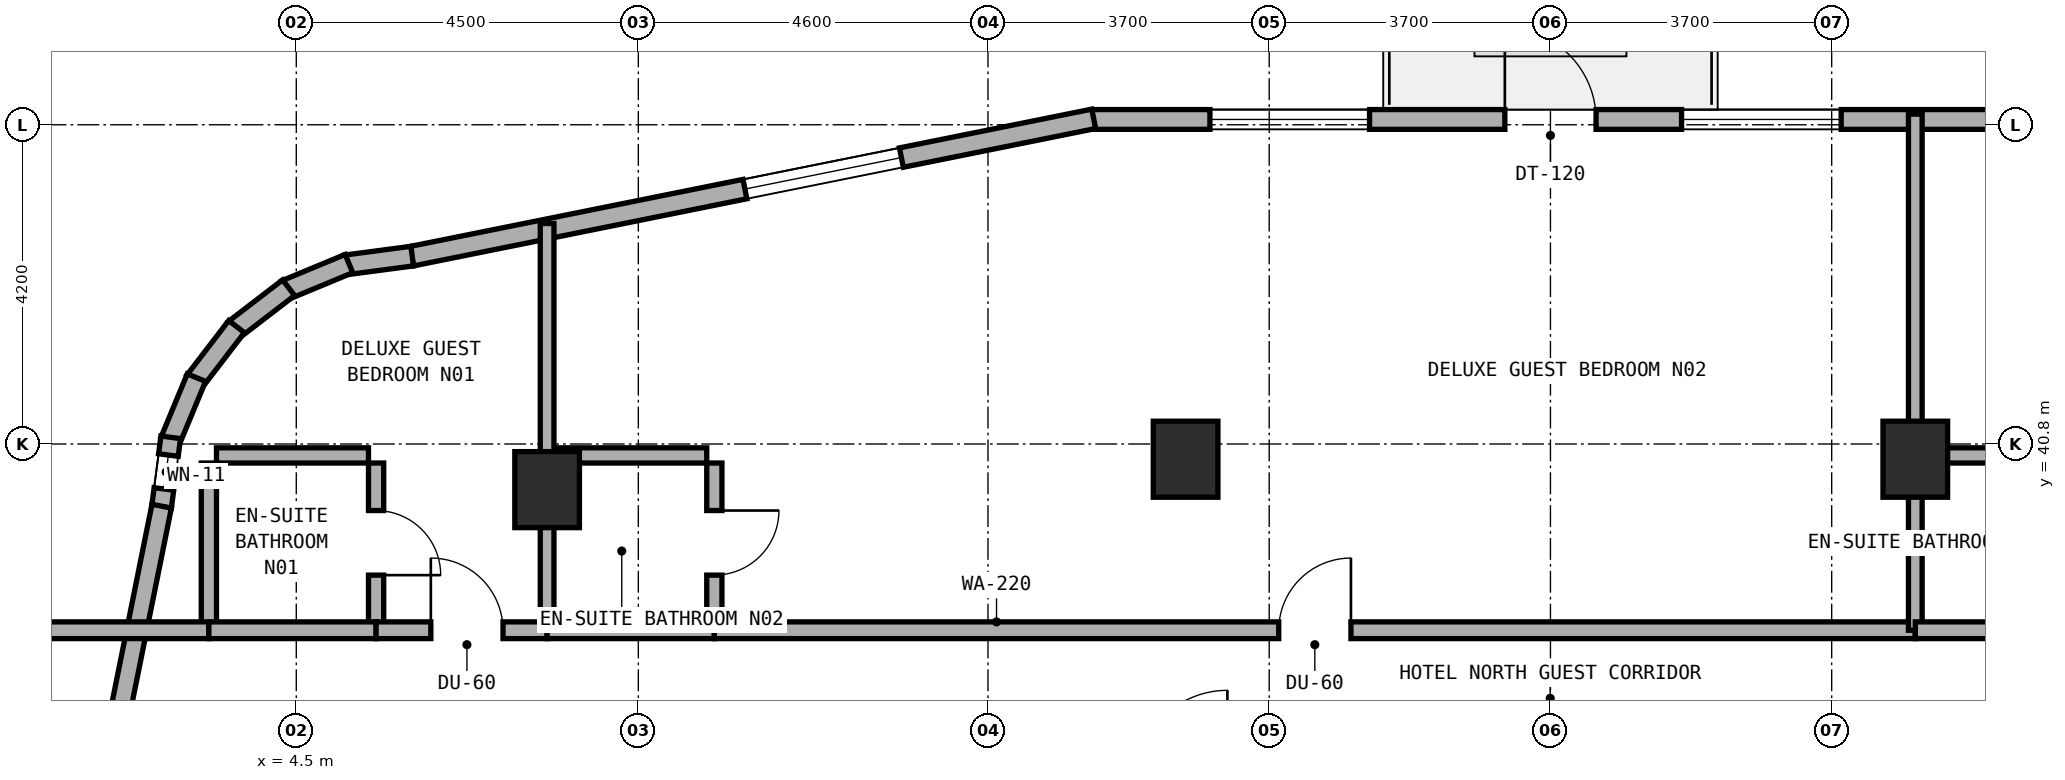
"""IFC4 building model, lengths in metres.
Left out: names, types, materials, properties, quantities, classifications, styles, units other than length and angle.
Written with IfcOpenShell. Run it as: python <this file> out.ifc"""

import sys

from ifc_helpers import new_model, si_unit, direction, frame, frame_2d, origin, origin_2d, place, context, subcontext, project, spatial, rectangle, extrude, element, fill, save


model = new_model("IFC4")
c1 = context("Model", 3, precision=1e-05, world=origin(), true_north=direction((0.0, 1.0)))
c2 = subcontext(c1, "Body", "Model", "MODEL_VIEW")
j1 = project(units=[si_unit("LENGTHUNIT", "METRE"), si_unit("PLANEANGLEUNIT", "RADIAN")], contexts=[c1])
p1 = place(None, origin())
s1 = spatial("IfcSite", under=j1, at=p1, CompositionType="ELEMENT")
p2 = place(p1, origin())
s2 = spatial("IfcBuilding", under=s1, at=p2, CompositionType="ELEMENT")
p3 = place(p2, frame((0.0, 0.0, 134.5)))
s3 = spatial("IfcBuildingStorey", under=s2, at=p3, CompositionType="ELEMENT", Elevation=134.5)
for number, where, z_axis, x_axis in (
    (1, (16.2, 40.6, 0.0), (0.0, 0.0, 1.0), (1.0, 0.0, 0.0)),
    (2, (25.8, 40.6, 0.0), (0.0, 0.0, 1.0), (1.0, 0.0, 0.0)),
    (3, (7.8, 40.2, 0.0), (0.0, 0.0, 1.0), (1.0, 0.0, 0.0)),
):
    element("IfcColumn", number, at=place(p3, frame(where, z_axis=z_axis, x_axis=x_axis)), inside=s3, PredefinedType="COLUMN", context=c2, shape_type="SweptSolid", body=[
        extrude(rectangle(XDim=0.85, YDim=1.0, at=origin_2d()), origin(), (0.0, 0.0, 1.0), 3.5),
    ])
p4 = place(p3, frame((27.085, 45.07, 0.0), z_axis=(0.0, 0.0, 1.0), x_axis=(-1.0, 0.0, 0.0)))
e4 = element("IfcWall", 4, at=p4, inside=s3, PredefinedType="STANDARD", context=c2, shape_type="SweptSolid", body=[
    extrude(rectangle(XDim=12.135, YDim=0.26, at=frame_2d((6.067, 0.0))), origin(), (0.0, 0.0, 1.0), 3.22),
])
p5 = place(p4, frame((5.485, 0.0, 0.0)))
e5 = element("IfcOpeningElement", 5, at=p5, cuts=e4, PredefinedType="OPENING", context=c2, shape_type="SweptSolid", body=[
    extrude(rectangle(XDim=1.2, YDim=2.15, at=frame_2d((0.6, 1.075))), frame((0.0, 0.14, 0.0), z_axis=(0.0, -1.0, 0.0), x_axis=(1.0, 0.0, 0.0)), (0.0, 0.0, 1.0), 0.28),
])
p6 = place(p4, frame((2.26, 0.0, 0.85)))
e6 = element("IfcOpeningElement", 6, at=p6, cuts=e4, PredefinedType="OPENING", context=c2, shape_type="SweptSolid", body=[
    extrude(rectangle(XDim=2.1, YDim=1.5, at=frame_2d((1.05, 0.75))), frame((0.0, 0.14, 0.0), z_axis=(0.0, -1.0, 0.0), x_axis=(1.0, 0.0, 0.0)), (0.0, 0.0, 1.0), 0.28),
])
p7 = place(p4, frame((8.465, 0.0, 0.85)))
e7 = element("IfcOpeningElement", 7, at=p7, cuts=e4, PredefinedType="OPENING", context=c2, shape_type="SweptSolid", body=[
    extrude(rectangle(XDim=2.1, YDim=1.5, at=frame_2d((1.05, 0.75))), frame((0.0, 0.14, 0.0), z_axis=(0.0, -1.0, 0.0), x_axis=(1.0, 0.0, 0.0)), (0.0, 0.0, 1.0), 0.28),
])
p8 = place(p3, frame((14.991, 45.078, 0.0), z_axis=(0.0, 0.0, 1.0), x_axis=(-0.980321298532, -0.197408590603, 0.0)))
e8 = element("IfcWall", 8, at=p8, inside=s3, PredefinedType="STANDARD", context=c2, shape_type="SweptSolid", body=[
    extrude(rectangle(XDim=9.153, YDim=0.26, at=frame_2d((4.577, 0.0))), origin(), (0.0, 0.0, 1.0), 3.22),
])
p9 = place(p8, frame((2.581, 0.0, 0.85)))
e9 = element("IfcOpeningElement", 9, at=p9, cuts=e8, PredefinedType="OPENING", context=c2, shape_type="SweptSolid", body=[
    extrude(rectangle(XDim=2.1, YDim=1.5, at=frame_2d((1.05, 0.75))), frame((0.0, 0.14, 0.0), z_axis=(0.0, -1.0, 0.0), x_axis=(1.0, 0.0, 0.0)), (0.0, 0.0, 1.0), 0.28),
])
p10 = place(p3, frame((6.025, 43.272, 0.0), z_axis=(0.0, 0.0, 1.0), x_axis=(-0.991388484223, -0.130953706898, 0.0)))
e10 = element("IfcWall", 10, at=p10, inside=s3, PredefinedType="STANDARD", context=c2, shape_type="SweptSolid", body=[
    extrude(rectangle(XDim=0.885, YDim=0.26, at=frame_2d((0.443, 0.0))), origin(), (0.0, 0.0, 1.0), 3.22),
])
p11 = place(p3, frame((5.193, 43.174, 0.0), z_axis=(0.0, 0.0, 1.0), x_axis=(-0.923627776508, -0.383290660547, 0.0)))
e11 = element("IfcWall", 11, at=p11, inside=s3, PredefinedType="STANDARD", context=c2, shape_type="SweptSolid", body=[
    extrude(rectangle(XDim=0.903, YDim=0.26, at=frame_2d((0.452, 0.0))), origin(), (0.0, 0.0, 1.0), 3.22),
])
p12 = place(p3, frame((4.399, 42.856, 0.0), z_axis=(0.0, 0.0, 1.0), x_axis=(-0.793458244748, -0.608624690463, 0.0)))
e12 = element("IfcWall", 12, at=p12, inside=s3, PredefinedType="STANDARD", context=c2, shape_type="SweptSolid", body=[
    extrude(rectangle(XDim=0.902, YDim=0.26, at=frame_2d((0.451, 0.0))), origin(), (0.0, 0.0, 1.0), 3.22),
])
p13 = place(p3, frame((3.714, 42.345, 0.0), z_axis=(0.0, 0.0, 1.0), x_axis=(-0.608494022858, -0.793558456666, 0.0)))
e13 = element("IfcWall", 13, at=p13, inside=s3, PredefinedType="STANDARD", context=c2, shape_type="SweptSolid", body=[
    extrude(rectangle(XDim=0.902, YDim=0.26, at=frame_2d((0.451, 0.0))), origin(), (0.0, 0.0, 1.0), 3.22),
])
p14 = place(p3, frame((3.186, 41.673, 0.0), z_axis=(0.0, 0.0, 1.0), x_axis=(-0.383155708213, -0.923683767999, 0.0)))
e14 = element("IfcWall", 14, at=p14, inside=s3, PredefinedType="STANDARD", context=c2, shape_type="SweptSolid", body=[
    extrude(rectangle(XDim=0.903, YDim=0.26, at=frame_2d((0.451, 0.0))), origin(), (0.0, 0.0, 1.0), 3.22),
])
p15 = place(p3, frame((2.848, 40.888, 0.0), z_axis=(0.0, 0.0, 1.0), x_axis=(-0.130200706103, -0.991487658083, 0.0)))
e15 = element("IfcWall", 15, at=p15, inside=s3, PredefinedType="STANDARD", context=c2, shape_type="SweptSolid", body=[
    extrude(rectangle(XDim=0.921, YDim=0.26, at=frame_2d((0.46, 0.0))), origin(), (0.0, 0.0, 1.0), 3.22),
])
p16 = place(p15, frame((0.235, 0.0, 0.85)))
e16 = element("IfcOpeningElement", 16, at=p16, cuts=e15, PredefinedType="OPENING", context=c2, shape_type="SweptSolid", body=[
    extrude(rectangle(XDim=0.45, YDim=1.5, at=frame_2d((0.225, 0.75))), frame((0.0, 0.14, 0.0), z_axis=(0.0, -1.0, 0.0), x_axis=(1.0, 0.0, 0.0)), (0.0, 0.0, 1.0), 0.28),
])
p17 = place(p3, frame((2.729, 39.982, 0.0), z_axis=(0.0, 0.0, 1.0), x_axis=(-0.197435082048, -0.980315963543, 0.0)))
e17 = element("IfcWall", 17, at=p17, inside=s3, PredefinedType="STANDARD", context=c2, shape_type="SweptSolid", body=[
    extrude(rectangle(XDim=9.183, YDim=0.26, at=frame_2d((4.591, 0.0))), origin(), (0.0, 0.0, 1.0), 3.22),
])
p18 = place(p17, frame((4.436, 0.0, 0.85)))
e18 = element("IfcOpeningElement", 18, at=p18, cuts=e17, PredefinedType="OPENING", context=c2, shape_type="SweptSolid", body=[
    extrude(rectangle(XDim=2.1, YDim=1.5, at=frame_2d((1.05, 0.75))), frame((0.0, 0.14, 0.0), z_axis=(0.0, -1.0, 0.0), x_axis=(1.0, 0.0, 0.0)), (0.0, 0.0, 1.0), 0.28),
])
p19 = place(p3, frame((5.55, 38.45, 0.0), z_axis=(0.0, 0.0, 1.0), x_axis=(0.0, 1.0, 0.0)))
e19 = element("IfcWall", 19, at=p19, inside=s3, PredefinedType="PLUMBINGWALL", context=c2, shape_type="SweptSolid", body=[
    extrude(rectangle(XDim=2.1, YDim=0.2, at=frame_2d((1.05, 0.0))), origin(), (0.0, 0.0, 1.0), 3.22),
])
p20 = place(p19, frame((0.625, 0.0, 0.0)))
e20 = element("IfcOpeningElement", 20, at=p20, cuts=e19, PredefinedType="OPENING", context=c2, shape_type="SweptSolid", body=[
    extrude(rectangle(XDim=0.85, YDim=2.1, at=frame_2d((0.425, 1.05))), frame((0.0, 0.11, 0.0), z_axis=(0.0, -1.0, 0.0), x_axis=(1.0, 0.0, 0.0)), (0.0, 0.0, 1.0), 0.22),
])
p21 = place(p3, frame((3.45, 40.65, 0.0), z_axis=(0.0, 0.0, 1.0), x_axis=(1.0, 0.0, 0.0)))
e21 = element("IfcWall", 21, at=p21, inside=s3, PredefinedType="PLUMBINGWALL", context=c2, shape_type="SweptSolid", body=[
    extrude(rectangle(XDim=2.0, YDim=0.2, at=frame_2d((1.0, 0.0))), origin(), (0.0, 0.0, 1.0), 3.22),
])
p22 = place(p3, frame((3.35, 38.45, 0.0), z_axis=(0.0, 0.0, 1.0), x_axis=(0.0, 1.0, 0.0)))
e22 = element("IfcWall", 22, at=p22, inside=s3, PredefinedType="PLUMBINGWALL", context=c2, shape_type="SweptSolid", body=[
    extrude(rectangle(XDim=2.1, YDim=0.2, at=frame_2d((1.05, 0.0))), origin(), (0.0, 0.0, 1.0), 3.22),
])
p23 = place(p3, frame((0.96, 38.35, 0.0), z_axis=(0.0, 0.0, 1.0), x_axis=(1.0, 0.0, 0.0)))
e23 = element("IfcWall", 23, at=p23, inside=s3, PredefinedType="SOLIDWALL", context=c2, shape_type="SweptSolid", body=[
    extrude(rectangle(XDim=2.39, YDim=0.22, at=frame_2d((1.195, 0.0))), origin(), (0.0, 0.0, 1.0), 3.22),
])
p24 = place(p3, frame((3.35, 38.35, 0.0), z_axis=(0.0, 0.0, 1.0), x_axis=(1.0, 0.0, 0.0)))
e24 = element("IfcWall", 24, at=p24, inside=s3, PredefinedType="SOLIDWALL", context=c2, shape_type="SweptSolid", body=[
    extrude(rectangle(XDim=2.2, YDim=0.22, at=frame_2d((1.1, 0.0))), origin(), (0.0, 0.0, 1.0), 3.22),
])
p25 = place(p3, frame((5.55, 38.35, 0.0), z_axis=(0.0, 0.0, 1.0), x_axis=(1.0, 0.0, 0.0)))
e25 = element("IfcWall", 25, at=p25, inside=s3, PredefinedType="SOLIDWALL", context=c2, shape_type="SweptSolid", body=[
    extrude(rectangle(XDim=2.25, YDim=0.22, at=frame_2d((1.125, 0.0))), origin(), (0.0, 0.0, 1.0), 2.695),
])
p26 = place(p25, frame((0.72, 0.0, 0.0)))
e26 = element("IfcOpeningElement", 26, at=p26, cuts=e25, PredefinedType="OPENING", context=c2, shape_type="SweptSolid", body=[
    extrude(rectangle(XDim=0.95, YDim=2.1, at=frame_2d((0.475, 1.05))), frame((0.0, 0.12, 0.0), z_axis=(0.0, -1.0, 0.0), x_axis=(1.0, 0.0, 0.0)), (0.0, 0.0, 1.0), 0.24),
])
p27 = place(p3, frame((7.8, 38.35, 0.0), z_axis=(0.0, 0.0, 1.0), x_axis=(0.0, 1.0, 0.0)))
e27 = element("IfcWall", 27, at=p27, inside=s3, PredefinedType="SOLIDWALL", context=c2, shape_type="SweptSolid", body=[
    extrude(rectangle(XDim=5.351, YDim=0.18, at=frame_2d((2.675, 0.0))), origin(), (0.0, 0.0, 1.0), 2.695),
])
p28 = place(p3, frame((10.0, 38.45, 0.0), z_axis=(0.0, 0.0, 1.0), x_axis=(0.0, 1.0, 0.0)))
e28 = element("IfcWall", 28, at=p28, inside=s3, PredefinedType="PLUMBINGWALL", context=c2, shape_type="SweptSolid", body=[
    extrude(rectangle(XDim=2.1, YDim=0.2, at=frame_2d((1.05, 0.0))), origin(), (0.0, 0.0, 1.0), 2.835),
])
p29 = place(p28, frame((0.625, 0.0, 0.0)))
e29 = element("IfcOpeningElement", 29, at=p29, cuts=e28, PredefinedType="OPENING", context=c2, shape_type="SweptSolid", body=[
    extrude(rectangle(XDim=0.85, YDim=2.1, at=frame_2d((0.425, 1.05))), frame((0.0, 0.11, 0.0), z_axis=(0.0, -1.0, 0.0), x_axis=(1.0, 0.0, 0.0)), (0.0, 0.0, 1.0), 0.22),
])
p30 = place(p3, frame((7.9, 40.65, 0.0), z_axis=(0.0, 0.0, 1.0), x_axis=(1.0, 0.0, 0.0)))
e30 = element("IfcWall", 30, at=p30, inside=s3, PredefinedType="PLUMBINGWALL", context=c2, shape_type="SweptSolid", body=[
    extrude(rectangle(XDim=2.0, YDim=0.2, at=frame_2d((1.0, 0.0))), origin(), (0.0, 0.0, 1.0), 3.22),
])
p31 = place(p3, frame((7.8, 38.35, 0.0), z_axis=(0.0, 0.0, 1.0), x_axis=(1.0, 0.0, 0.0)))
e31 = element("IfcWall", 31, at=p31, inside=s3, PredefinedType="SOLIDWALL", context=c2, shape_type="SweptSolid", body=[
    extrude(rectangle(XDim=2.2, YDim=0.22, at=frame_2d((1.1, 0.0))), origin(), (0.0, 0.0, 1.0), 2.695),
])
p32 = place(p3, frame((10.0, 38.35, 0.0), z_axis=(0.0, 0.0, 1.0), x_axis=(1.0, 0.0, 0.0)))
e32 = element("IfcWall", 32, at=p32, inside=s3, PredefinedType="SOLIDWALL", context=c2, shape_type="SweptSolid", body=[
    extrude(rectangle(XDim=15.8, YDim=0.22, at=frame_2d((7.9, 0.0))), origin(), (0.0, 0.0, 1.0), 2.695),
])
p33 = place(p32, frame((7.425, 0.0, 0.0)))
e33 = element("IfcOpeningElement", 33, at=p33, cuts=e32, PredefinedType="OPENING", context=c2, shape_type="SweptSolid", body=[
    extrude(rectangle(XDim=0.95, YDim=2.1, at=frame_2d((0.475, 1.05))), frame((0.0, 0.12, 0.0), z_axis=(0.0, -1.0, 0.0), x_axis=(1.0, 0.0, 0.0)), (0.0, 0.0, 1.0), 0.24),
])
p34 = place(p3, frame((25.8, 38.35, 0.0), z_axis=(0.0, 0.0, 1.0), x_axis=(0.0, 1.0, 0.0)))
e34 = element("IfcWall", 34, at=p34, inside=s3, PredefinedType="SOLIDWALL", context=c2, shape_type="SweptSolid", body=[
    extrude(rectangle(XDim=6.79, YDim=0.18, at=frame_2d((3.395, 0.0))), origin(), (0.0, 0.0, 1.0), 2.695),
])
p35 = place(p3, frame((25.9, 40.65, 0.0), z_axis=(0.0, 0.0, 1.0), x_axis=(1.0, 0.0, 0.0)))
e35 = element("IfcWall", 35, at=p35, inside=s3, PredefinedType="PLUMBINGWALL", context=c2, shape_type="SweptSolid", body=[
    extrude(rectangle(XDim=2.0, YDim=0.2, at=frame_2d((1.0, 0.0))), origin(), (0.0, 0.0, 1.0), 2.835),
])
p36 = place(p3, frame((25.8, 38.35, 0.0), z_axis=(0.0, 0.0, 1.0), x_axis=(1.0, 0.0, 0.0)))
e36 = element("IfcWall", 36, at=p36, inside=s3, PredefinedType="SOLIDWALL", context=c2, shape_type="SweptSolid", body=[
    extrude(rectangle(XDim=2.2, YDim=0.22, at=frame_2d((1.1, 0.0))), origin(), (0.0, 0.0, 1.0), 2.695),
])
p37 = place(p5, frame((1.2, 0.0, 0.0), z_axis=(0.0, 0.0, 1.0), x_axis=(-1.0, 0.0, 0.0)))
e37 = element("IfcDoor", 37, at=p37, inside=s3, OperationType="SINGLE_SWING_LEFT", PredefinedType="DOOR", context=c2, shape_type="SweptSolid", body=[
    extrude(rectangle(XDim=1.2, YDim=2.15, at=frame_2d((0.6, 1.075))), frame((0.0, 0.025, 0.0), z_axis=(0.0, -1.0, 0.0), x_axis=(1.0, 0.0, 0.0)), (0.0, 0.0, 1.0), 0.05),
])
fill(e5, e37)
p38 = place(p6, origin())
e38 = element("IfcWindow", 38, at=p38, inside=s3, PartitioningType="SINGLE_PANEL", PredefinedType="WINDOW", context=c2, shape_type="SweptSolid", body=[
    extrude(rectangle(XDim=2.1, YDim=1.5, at=frame_2d((1.05, 0.75))), frame((0.0, 0.03, 0.0), z_axis=(0.0, -1.0, 0.0), x_axis=(1.0, 0.0, 0.0)), (0.0, 0.0, 1.0), 0.06),
])
fill(e6, e38)
p39 = place(p7, origin())
e39 = element("IfcWindow", 39, at=p39, inside=s3, PartitioningType="SINGLE_PANEL", PredefinedType="WINDOW", context=c2, shape_type="SweptSolid", body=[
    extrude(rectangle(XDim=2.1, YDim=1.5, at=frame_2d((1.05, 0.75))), frame((0.0, 0.03, 0.0), z_axis=(0.0, -1.0, 0.0), x_axis=(1.0, 0.0, 0.0)), (0.0, 0.0, 1.0), 0.06),
])
fill(e7, e39)
p40 = place(p9, origin())
e40 = element("IfcWindow", 40, at=p40, inside=s3, PartitioningType="SINGLE_PANEL", PredefinedType="WINDOW", context=c2, shape_type="SweptSolid", body=[
    extrude(rectangle(XDim=2.1, YDim=1.5, at=frame_2d((1.05, 0.75))), frame((0.0, 0.03, 0.0), z_axis=(0.0, -1.0, 0.0), x_axis=(1.0, 0.0, 0.0)), (0.0, 0.0, 1.0), 0.06),
])
fill(e9, e40)
p41 = place(p16, origin())
e41 = element("IfcWindow", 41, at=p41, inside=s3, PartitioningType="SINGLE_PANEL", PredefinedType="WINDOW", context=c2, shape_type="SweptSolid", body=[
    extrude(rectangle(XDim=0.45, YDim=1.5, at=frame_2d((0.225, 0.75))), frame((0.0, 0.03, 0.0), z_axis=(0.0, -1.0, 0.0), x_axis=(1.0, 0.0, 0.0)), (0.0, 0.0, 1.0), 0.06),
])
fill(e16, e41)
p42 = place(p20, frame((0.85, 0.0, 0.0), z_axis=(0.0, 0.0, 1.0), x_axis=(-1.0, 0.0, 0.0)))
e42 = element("IfcDoor", 42, at=p42, inside=s3, OperationType="SINGLE_SWING_RIGHT", PredefinedType="DOOR", context=c2, shape_type="SweptSolid", body=[
    extrude(rectangle(XDim=0.85, YDim=2.1, at=frame_2d((0.425, 1.05))), frame((0.0, 0.025, 0.0), z_axis=(0.0, -1.0, 0.0), x_axis=(1.0, 0.0, 0.0)), (0.0, 0.0, 1.0), 0.05),
])
fill(e20, e42)
p43 = place(p26, origin())
e43 = element("IfcDoor", 43, at=p43, inside=s3, OperationType="SINGLE_SWING_LEFT", PredefinedType="DOOR", context=c2, shape_type="SweptSolid", body=[
    extrude(rectangle(XDim=0.95, YDim=2.1, at=frame_2d((0.475, 1.05))), frame((0.0, 0.025, 0.0), z_axis=(0.0, -1.0, 0.0), x_axis=(1.0, 0.0, 0.0)), (0.0, 0.0, 1.0), 0.05),
])
fill(e26, e43)
p44 = place(p29, frame((0.85, 0.0, 0.0), z_axis=(0.0, 0.0, 1.0), x_axis=(-1.0, 0.0, 0.0)))
e44 = element("IfcDoor", 44, at=p44, inside=s3, OperationType="SINGLE_SWING_LEFT", PredefinedType="DOOR", context=c2, shape_type="SweptSolid", body=[
    extrude(rectangle(XDim=0.85, YDim=2.1, at=frame_2d((0.425, 1.05))), frame((0.0, 0.025, 0.0), z_axis=(0.0, -1.0, 0.0), x_axis=(1.0, 0.0, 0.0)), (0.0, 0.0, 1.0), 0.05),
])
fill(e29, e44)
p45 = place(p33, origin())
e45 = element("IfcDoor", 45, at=p45, inside=s3, OperationType="SINGLE_SWING_RIGHT", PredefinedType="DOOR", context=c2, shape_type="SweptSolid", body=[
    extrude(rectangle(XDim=0.95, YDim=2.1, at=frame_2d((0.475, 1.05))), frame((0.0, 0.025, 0.0), z_axis=(0.0, -1.0, 0.0), x_axis=(1.0, 0.0, 0.0)), (0.0, 0.0, 1.0), 0.05),
])
fill(e33, e45)
save(model, sys.argv[1])
